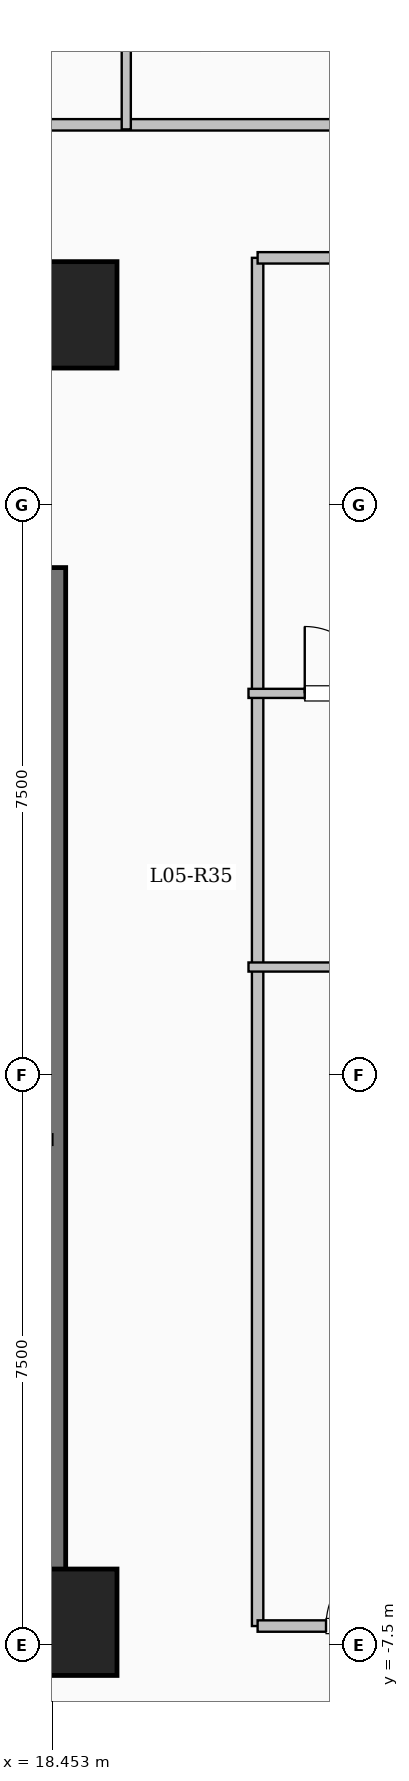
"""IFC4 building model, lengths in metres.
Left out: names, types, materials, properties, quantities, classifications, styles, units other than length and angle.
Written with IfcOpenShell. Run it as: python <this file> out.ifc"""

import sys

from ifc_helpers import new_model, si_unit, direction, frame, frame_2d, origin, origin_2d, place, context, subcontext, project, spatial, rectangle, extrude, element, fill, save


model = new_model("IFC4")
c1 = context("Model", 3, precision=1e-05, world=origin(), true_north=direction((0.0, 1.0)))
c2 = subcontext(c1, "Body", "Model", "MODEL_VIEW")
j1 = project(units=[si_unit("LENGTHUNIT", "METRE"), si_unit("PLANEANGLEUNIT", "RADIAN")], contexts=[c1])
p1 = place(None, origin())
s1 = spatial("IfcSite", under=j1, at=p1, CompositionType="ELEMENT")
p2 = place(p1, origin())
s2 = spatial("IfcBuilding", under=s1, at=p2, CompositionType="ELEMENT")
p3 = place(p2, frame((0.0, 0.0, 24.0)))
s3 = spatial("IfcBuildingStorey", under=s2, at=p3, CompositionType="ELEMENT", Elevation=24.0)
for number, where, z_axis, x_axis in (
    (1, (18.6, -7.2, 0.0), (0.0, 0.0, 1.0), (1.0, 0.0, 0.0)),
    (2, (18.6, 10.0, 0.0), (0.0, 0.0, 1.0), (1.0, 0.0, 0.0)),
):
    element("IfcColumn", number, at=place(p3, frame(where, z_axis=z_axis, x_axis=x_axis)), inside=s3, PredefinedType="COLUMN", context=c2, shape_type="SweptSolid", body=[
        extrude(rectangle(XDim=1.4, YDim=1.4, at=origin_2d()), origin(), (0.0, 0.0, 1.0), 3.35),
    ])
p4 = place(p3, frame((18.45, -7.375, 0.0), z_axis=(0.0, 0.0, 1.0), x_axis=(0.0, 1.0, 0.0)))
e3 = element("IfcWall", 3, at=p4, inside=s3, PredefinedType="SHEAR", context=c2, shape_type="SweptSolid", body=[
    extrude(rectangle(XDim=14.05, YDim=0.35, at=frame_2d((7.025, 0.0))), origin(), (0.0, 0.0, 1.0), 3.35),
])
p5 = place(p3, frame((10.075, -7.2, 0.0), z_axis=(0.0, 0.0, 1.0), x_axis=(1.0, 0.0, 0.0)))
e4 = element("IfcWall", 4, at=p5, inside=s3, PredefinedType="SHEAR", context=c2, shape_type="SweptSolid", body=[
    extrude(rectangle(XDim=8.55, YDim=0.35, at=frame_2d((4.275, 0.0))), origin(), (0.0, 0.0, 1.0), 3.35),
])
p6 = place(p3, frame((3.85, 12.5, 0.0), z_axis=(0.0, 0.0, 1.0), x_axis=(1.0, 0.0, 0.0)))
e5 = element("IfcWall", 5, at=p6, inside=s3, PredefinedType="PARTITIONING", context=c2, shape_type="SweptSolid", body=[
    extrude(rectangle(XDim=18.7, YDim=0.15, at=frame_2d((9.35, 0.0))), origin(), (0.0, 0.0, 1.0), 3.1),
])
p7 = place(p6, frame((0.7, 0.0, 0.0)))
e6 = element("IfcOpeningElement", 6, at=p7, cuts=e5, PredefinedType="OPENING", context=c2, shape_type="SweptSolid", body=[
    extrude(rectangle(XDim=0.96, YDim=2.15, at=frame_2d((0.48, 1.075))), frame((0.0, 0.085, 0.0), z_axis=(0.0, -1.0, 0.0), x_axis=(1.0, 0.0, 0.0)), (0.0, 0.0, 1.0), 0.17),
])
p8 = place(p6, frame((8.4, 0.0, 0.0)))
e7 = element("IfcOpeningElement", 7, at=p8, cuts=e5, PredefinedType="OPENING", context=c2, shape_type="SweptSolid", body=[
    extrude(rectangle(XDim=0.96, YDim=2.15, at=frame_2d((0.48, 1.075))), frame((0.0, 0.085, 0.0), z_axis=(0.0, -1.0, 0.0), x_axis=(1.0, 0.0, 0.0)), (0.0, 0.0, 1.0), 0.17),
])
p9 = place(p3, frame((21.15, -7.25, 0.0), z_axis=(0.0, 0.0, 1.0), x_axis=(0.0, 1.0, 0.0)))
e8 = element("IfcWall", 8, at=p9, inside=s3, PredefinedType="PARTITIONING", context=c2, shape_type="SweptSolid", body=[
    extrude(rectangle(XDim=18.0, YDim=0.15, at=frame_2d((9.0, 0.0))), origin(), (0.0, 0.0, 1.0), 2.585),
])
p10 = place(p3, frame((19.422, 12.44, 0.0), z_axis=(0.0, 0.0, 1.0), x_axis=(0.0, 1.0, 0.0)))
e9 = element("IfcWall", 9, at=p10, inside=s3, PredefinedType="PARTITIONING", context=c2, shape_type="SweptSolid", body=[
    extrude(rectangle(XDim=2.45, YDim=0.12, at=frame_2d((1.225, 0.0))), origin(), (0.0, 0.0, 1.0), 3.1),
])
p11 = place(p3, frame((21.15, -7.25, 0.0), z_axis=(0.0, 0.0, 1.0), x_axis=(1.0, 0.0, 0.0)))
e10 = element("IfcWall", 10, at=p11, inside=s3, PredefinedType="PARTITIONING", context=c2, shape_type="SweptSolid", body=[
    extrude(rectangle(XDim=7.53, YDim=0.15, at=frame_2d((3.765, 0.0))), origin(), (0.0, 0.0, 1.0), 3.1),
])
p12 = place(p11, frame((0.9, 0.0, 0.0)))
e11 = element("IfcOpeningElement", 11, at=p12, cuts=e10, PredefinedType="OPENING", context=c2, shape_type="SweptSolid", body=[
    extrude(rectangle(XDim=0.96, YDim=2.15, at=frame_2d((0.48, 1.075))), frame((0.0, 0.085, 0.0), z_axis=(0.0, -1.0, 0.0), x_axis=(1.0, 0.0, 0.0)), (0.0, 0.0, 1.0), 0.17),
])
p13 = place(p3, frame((21.15, 10.75, 0.0), z_axis=(0.0, 0.0, 1.0), x_axis=(1.0, 0.0, 0.0)))
e12 = element("IfcWall", 12, at=p13, inside=s3, PredefinedType="PARTITIONING", context=c2, shape_type="SweptSolid", body=[
    extrude(rectangle(XDim=7.53, YDim=0.15, at=frame_2d((3.765, 0.0))), origin(), (0.0, 0.0, 1.0), 3.1),
])
p14 = place(p3, frame((21.03, 1.42, 0.0), z_axis=(0.0, 0.0, 1.0), x_axis=(1.0, 0.0, 0.0)))
e13 = element("IfcWall", 13, at=p14, inside=s3, PredefinedType="PARTITIONING", context=c2, shape_type="SweptSolid", body=[
    extrude(rectangle(XDim=7.77, YDim=0.12, at=frame_2d((3.885, 0.0))), origin(), (0.0, 0.0, 1.0), 3.1),
])
p15 = place(p14, frame((1.615, 0.0, 0.0)))
e14 = element("IfcOpeningElement", 14, at=p15, cuts=e13, PredefinedType="OPENING", context=c2, shape_type="SweptSolid", body=[
    extrude(rectangle(XDim=0.88, YDim=2.1, at=frame_2d((0.44, 1.05))), frame((0.0, 0.07, 0.0), z_axis=(0.0, -1.0, 0.0), x_axis=(1.0, 0.0, 0.0)), (0.0, 0.0, 1.0), 0.14),
])
p16 = place(p14, frame((5.345, 0.0, 0.0)))
e15 = element("IfcOpeningElement", 15, at=p16, cuts=e13, PredefinedType="OPENING", context=c2, shape_type="SweptSolid", body=[
    extrude(rectangle(XDim=0.88, YDim=2.1, at=frame_2d((0.44, 1.05))), frame((0.0, 0.07, 0.0), z_axis=(0.0, -1.0, 0.0), x_axis=(1.0, 0.0, 0.0)), (0.0, 0.0, 1.0), 0.14),
])
p17 = place(p3, frame((21.03, 5.02, 0.0), z_axis=(0.0, 0.0, 1.0), x_axis=(1.0, 0.0, 0.0)))
e16 = element("IfcWall", 16, at=p17, inside=s3, PredefinedType="PARTITIONING", context=c2, shape_type="SweptSolid", body=[
    extrude(rectangle(XDim=7.77, YDim=0.12, at=frame_2d((3.885, 0.0))), origin(), (0.0, 0.0, 1.0), 3.1),
])
p18 = place(p17, frame((0.74, 0.0, 0.0)))
e17 = element("IfcOpeningElement", 17, at=p18, cuts=e16, PredefinedType="OPENING", context=c2, shape_type="SweptSolid", body=[
    extrude(rectangle(XDim=0.88, YDim=2.1, at=frame_2d((0.44, 1.05))), frame((0.0, 0.07, 0.0), z_axis=(0.0, -1.0, 0.0), x_axis=(1.0, 0.0, 0.0)), (0.0, 0.0, 1.0), 0.14),
])
p19 = place(p12, origin())
e18 = element("IfcDoor", 18, at=p19, inside=s3, OperationType="SINGLE_SWING_RIGHT", PredefinedType="DOOR", context=c2, shape_type="SweptSolid", body=[
    extrude(rectangle(XDim=0.96, YDim=2.15, at=frame_2d((0.48, 1.075))), frame((0.0, 0.025, 0.0), z_axis=(0.0, -1.0, 0.0), x_axis=(1.0, 0.0, 0.0)), (0.0, 0.0, 1.0), 0.05),
])
fill(e11, e18)
p20 = place(p18, origin())
e19 = element("IfcDoor", 19, at=p20, inside=s3, OperationType="SINGLE_SWING_LEFT", PredefinedType="DOOR", context=c2, shape_type="SweptSolid", body=[
    extrude(rectangle(XDim=0.88, YDim=2.1, at=frame_2d((0.44, 1.05))), frame((0.0, 0.025, 0.0), z_axis=(0.0, -1.0, 0.0), x_axis=(1.0, 0.0, 0.0)), (0.0, 0.0, 1.0), 0.05),
])
fill(e17, e19)
save(model, sys.argv[1])
